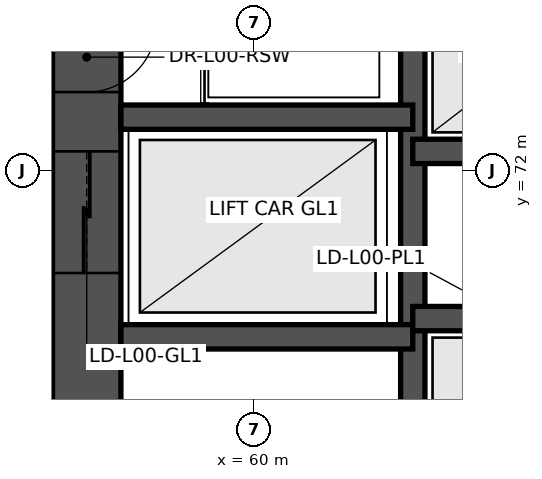
"""IFC4 building model, lengths in metres.
Left out: names, types, materials, properties, quantities, classifications, styles, units other than length and angle.
Written with IfcOpenShell. Run it as: python <this file> out.ifc"""

import sys

from ifc_helpers import new_model, si_unit, direction, frame, frame_2d, origin, place, context, subcontext, project, spatial, rectangle, extrude, element, fill, save


model = new_model("IFC4")
c1 = context("Model", 3, precision=1e-05, world=origin(), true_north=direction((0.0, 1.0)))
c2 = subcontext(c1, "Body", "Model", "MODEL_VIEW")
j1 = project(units=[si_unit("LENGTHUNIT", "METRE"), si_unit("PLANEANGLEUNIT", "RADIAN")], contexts=[c1])
p1 = place(None, origin())
s1 = spatial("IfcSite", under=j1, at=p1, CompositionType="ELEMENT")
p2 = place(p1, origin())
s2 = spatial("IfcBuilding", under=s1, at=p2, CompositionType="ELEMENT")
p3 = place(p2, origin())
s3 = spatial("IfcBuildingStorey", under=s2, at=p3, CompositionType="ELEMENT", Elevation=0.0)
p4 = place(p3, frame((57.8, 74.8, 0.0), z_axis=(0.0, 0.0, 1.0), x_axis=(0.0, -1.0, 0.0)))
e1 = element("IfcWall", 1, at=p4, inside=s3, PredefinedType="SHEAR", context=c2, shape_type="SweptSolid", body=[
    extrude(rectangle(XDim=13.6, YDim=0.9, at=frame_2d((6.8, 0.0))), origin(), (0.0, 0.0, 1.0), 5.4),
])
p5 = place(p4, frame((0.85, 0.0, 0.0)))
e2 = element("IfcOpeningElement", 2, at=p5, cuts=e1, PredefinedType="OPENING", context=c2, shape_type="SweptSolid", body=[
    extrude(rectangle(XDim=0.92, YDim=2.05, at=frame_2d((0.46, 1.025))), frame((0.0, 0.46, 0.0), z_axis=(0.0, -1.0, 0.0), x_axis=(1.0, 0.0, 0.0)), (0.0, 0.0, 1.0), 0.92),
])
p6 = place(p4, frame((2.55, 0.0, 0.0)))
e3 = element("IfcOpeningElement", 3, at=p6, cuts=e1, PredefinedType="OPENING", context=c2, shape_type="SweptSolid", body=[
    extrude(rectangle(XDim=1.6, YDim=2.3, at=frame_2d((0.8, 1.15))), frame((0.0, 0.46, 0.0), z_axis=(0.0, -1.0, 0.0), x_axis=(1.0, 0.0, 0.0)), (0.0, 0.0, 1.0), 0.92),
])
p7 = place(p3, frame((62.09, 61.65, 0.0), z_axis=(0.0, 0.0, 1.0), x_axis=(0.0, 1.0, 0.0)))
e4 = element("IfcWall", 4, at=p7, inside=s3, PredefinedType="SHEAR", context=c2, shape_type="SweptSolid", body=[
    extrude(rectangle(XDim=12.7, YDim=0.32, at=frame_2d((6.35, 0.0))), origin(), (0.0, 0.0, 1.0), 5.4),
])
p8 = place(p7, frame((0.55, 0.0, 0.0)))
e5 = element("IfcOpeningElement", 5, at=p8, cuts=e4, PredefinedType="OPENING", context=c2, shape_type="SweptSolid", body=[
    extrude(rectangle(XDim=1.15, YDim=2.15, at=frame_2d((0.575, 1.075))), frame((0.0, 0.17, 0.0), z_axis=(0.0, -1.0, 0.0), x_axis=(1.0, 0.0, 0.0)), (0.0, 0.0, 1.0), 0.34),
])
for number, where, z_axis, x_axis in (
    (6, (58.25, 69.81, 0.0), (0.0, 0.0, 1.0), (1.0, 0.0, 0.0)),
    (7, (58.25, 72.7, 0.0), (0.0, 0.0, 1.0), (1.0, 0.0, 0.0)),
):
    element("IfcWall", number, at=place(p3, frame(where, z_axis=z_axis, x_axis=x_axis)), inside=s3, PredefinedType="SHEAR", context=c2, shape_type="SweptSolid", body=[
        extrude(rectangle(XDim=3.84, YDim=0.32, at=frame_2d((1.92, 0.0))), origin(), (0.0, 0.0, 1.0), 5.4),
    ])
p9 = place(p3, frame((62.09, 70.05, 0.0), z_axis=(0.0, 0.0, 1.0), x_axis=(1.0, 0.0, 0.0)))
e8 = element("IfcWall", 8, at=p9, inside=s3, PredefinedType="SHEAR", context=c2, shape_type="SweptSolid", body=[
    extrude(rectangle(XDim=7.82, YDim=0.32, at=frame_2d((3.91, 0.0))), origin(), (0.0, 0.0, 1.0), 5.4),
])
p10 = place(p9, frame((0.8, 0.0, 0.0)))
e9 = element("IfcOpeningElement", 9, at=p10, cuts=e8, PredefinedType="OPENING", context=c2, shape_type="SweptSolid", body=[
    extrude(rectangle(XDim=1.1, YDim=2.2, at=frame_2d((0.55, 1.1))), frame((0.0, 0.17, 0.0), z_axis=(0.0, -1.0, 0.0), x_axis=(1.0, 0.0, 0.0)), (0.0, 0.0, 1.0), 0.34),
])
p11 = place(p9, frame((3.55, 0.0, 0.0)))
e10 = element("IfcOpeningElement", 10, at=p11, cuts=e8, PredefinedType="OPENING", context=c2, shape_type="SweptSolid", body=[
    extrude(rectangle(XDim=1.1, YDim=2.2, at=frame_2d((0.55, 1.1))), frame((0.0, 0.17, 0.0), z_axis=(0.0, -1.0, 0.0), x_axis=(1.0, 0.0, 0.0)), (0.0, 0.0, 1.0), 0.34),
])
p12 = place(p9, frame((6.1, 0.0, 0.0)))
e11 = element("IfcOpeningElement", 11, at=p12, cuts=e8, PredefinedType="OPENING", context=c2, shape_type="SweptSolid", body=[
    extrude(rectangle(XDim=1.1, YDim=2.2, at=frame_2d((0.55, 1.1))), frame((0.0, 0.17, 0.0), z_axis=(0.0, -1.0, 0.0), x_axis=(1.0, 0.0, 0.0)), (0.0, 0.0, 1.0), 0.34),
])
p13 = place(p3, frame((62.09, 72.25, 0.0), z_axis=(0.0, 0.0, 1.0), x_axis=(1.0, 0.0, 0.0)))
e12 = element("IfcWall", 12, at=p13, inside=s3, PredefinedType="SHEAR", context=c2, shape_type="SweptSolid", body=[
    extrude(rectangle(XDim=2.76, YDim=0.32, at=frame_2d((1.38, 0.0))), origin(), (0.0, 0.0, 1.0), 5.4),
])
p14 = place(p13, frame((0.85, 0.0, 0.0)))
e13 = element("IfcOpeningElement", 13, at=p14, cuts=e12, PredefinedType="OPENING", context=c2, shape_type="SweptSolid", body=[
    extrude(rectangle(XDim=1.1, YDim=2.2, at=frame_2d((0.55, 1.1))), frame((0.0, 0.17, 0.0), z_axis=(0.0, -1.0, 0.0), x_axis=(1.0, 0.0, 0.0)), (0.0, 0.0, 1.0), 0.34),
])
p15 = place(p5, origin())
e14 = element("IfcDoor", 14, at=p15, inside=s3, OperationType="SINGLE_SWING_LEFT", PredefinedType="DOOR", context=c2, shape_type="SweptSolid", body=[
    extrude(rectangle(XDim=0.92, YDim=2.05, at=frame_2d((0.46, 1.025))), frame((0.0, 0.025, 0.0), z_axis=(0.0, -1.0, 0.0), x_axis=(1.0, 0.0, 0.0)), (0.0, 0.0, 1.0), 0.05),
])
fill(e2, e14)
p16 = place(p6, origin())
e15 = element("IfcDoor", 15, at=p16, inside=s3, OperationType="DOUBLE_DOOR_SLIDING", PredefinedType="DOOR", context=c2, shape_type="SweptSolid", body=[
    extrude(rectangle(XDim=1.6, YDim=2.3, at=frame_2d((0.8, 1.15))), frame((0.0, 0.025, 0.0), z_axis=(0.0, -1.0, 0.0), x_axis=(1.0, 0.0, 0.0)), (0.0, 0.0, 1.0), 0.05),
])
fill(e3, e15)
save(model, sys.argv[1])
